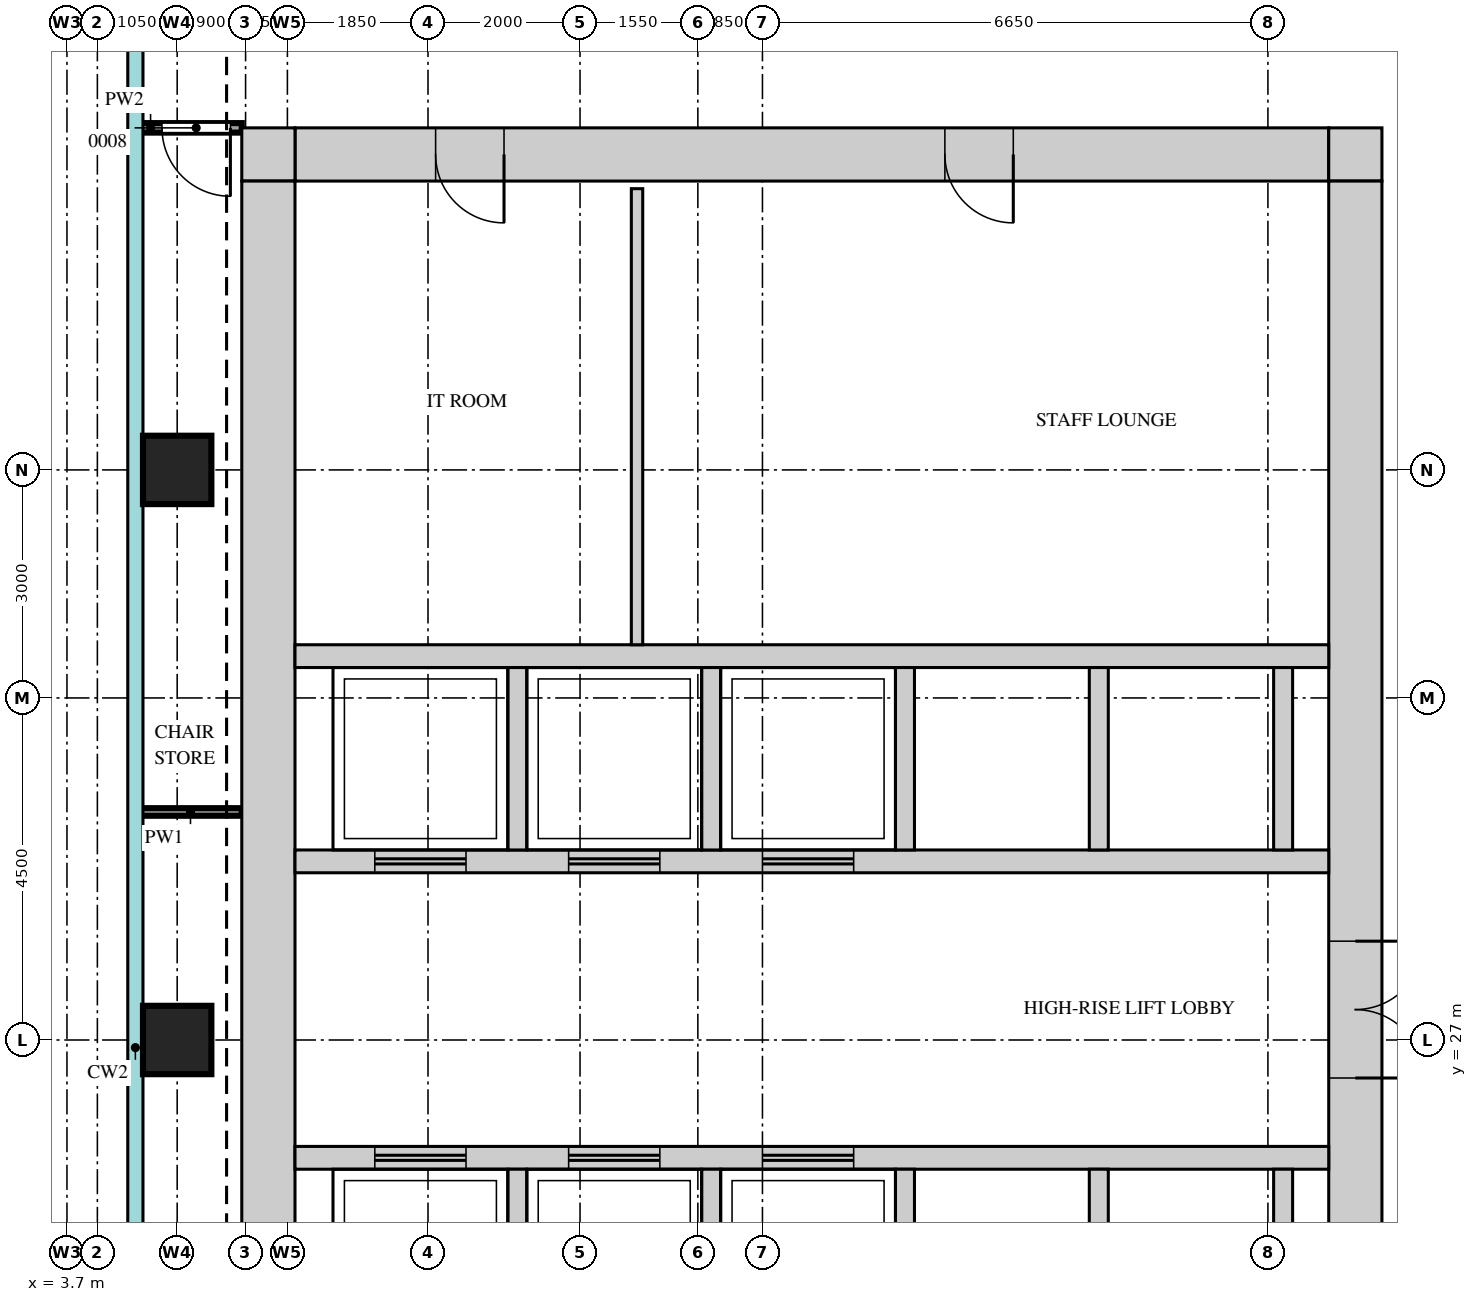
"""IFC4 building model, lengths in metres.
Left out: names, types, materials, properties, quantities, classifications, styles, units other than length and angle.
Written with IfcOpenShell. Run it as: python <this file> out.ifc"""

import sys

from ifc_helpers import new_model, si_unit, direction, frame, frame_2d, origin, origin_2d, place, context, subcontext, project, spatial, rectangle, extrude, source, transform, mapped, element, fill, save


model = new_model("IFC4")
c1 = context("Model", 3, precision=1e-05, world=origin(), true_north=direction((0.0, 1.0)))
c2 = subcontext(c1, "Body", "Model", "MODEL_VIEW")
j1 = project(units=[si_unit("LENGTHUNIT", "METRE"), si_unit("PLANEANGLEUNIT", "RADIAN")], contexts=[c1])
p1 = place(None, origin())
s1 = spatial("IfcSite", under=j1, at=p1, CompositionType="ELEMENT")
p2 = place(p1, origin())
s2 = spatial("IfcBuilding", under=s1, at=p2, CompositionType="ELEMENT")
p3 = place(p2, frame((0.0, 0.0, 262.2)))
s3 = spatial("IfcBuildingStorey", under=s2, at=p3, CompositionType="ELEMENT", Elevation=262.2)
m1 = source(origin(), c2, "Body", "SweptSolid", [
    extrude(rectangle(XDim=13.6, YDim=0.7, at=frame_2d((6.8, 0.0))), origin(), (0.0, 0.0, 1.0), 3.75),
])
p4 = place(p3, frame((6.7, 38.65, 0.0), z_axis=(0.0, 0.0, 1.0), x_axis=(1.0, 0.0, 0.0)))
e1 = element("IfcWall", 1, at=p4, inside=s3, PredefinedType="SHEAR", context=c2, shape_type="MappedRepresentation", body=[
    mapped(m1, transform((0.0, 0.0, 0.0))),
])
m2 = source(origin(), c2, "Body", "SweptSolid", [
    extrude(rectangle(XDim=0.9, YDim=2.1, at=frame_2d((0.45, 1.05))), frame((0.0, 0.36, 0.0), z_axis=(0.0, -1.0, 0.0), x_axis=(1.0, 0.0, 0.0)), (0.0, 0.0, 1.0), 0.72),
])
p5 = place(p4, frame((1.85, 0.0, 0.0)))
e2 = element("IfcOpeningElement", 2, at=p5, cuts=e1, PredefinedType="OPENING", context=c2, shape_type="MappedRepresentation", body=[
    mapped(m2, transform((0.0, 0.0, 0.0))),
])
p6 = place(p4, frame((8.55, 0.0, 0.0)))
e3 = element("IfcOpeningElement", 3, at=p6, cuts=e1, PredefinedType="OPENING", context=c2, shape_type="MappedRepresentation", body=[
    mapped(m2, transform((0.0, 0.0, 0.0))),
])
m3 = source(origin(), c2, "Body", "SweptSolid", [
    extrude(rectangle(XDim=0.7, YDim=0.7, at=frame_2d((0.35, 0.0))), origin(), (0.0, 0.0, 1.0), 3.75),
])
for number, where, z_axis, x_axis in (
    (4, (20.3, 38.65, 0.0), (0.0, 0.0, 1.0), (1.0, 0.0, 0.0)),
    (5, (6.0, 38.65, 0.0), (0.0, 0.0, 1.0), (1.0, 0.0, 0.0)),
):
    element("IfcWall", number, at=place(p3, frame(where, z_axis=z_axis, x_axis=x_axis)), inside=s3, PredefinedType="SHEAR", context=c2, shape_type="MappedRepresentation", body=[
        mapped(m3, transform((0.0, 0.0, 0.0))),
    ])
m4 = source(origin(), c2, "Body", "SweptSolid", [
    extrude(rectangle(XDim=22.6, YDim=0.7, at=frame_2d((11.3, 0.0))), origin(), (0.0, 0.0, 1.0), 3.75),
])
p7 = place(p3, frame((20.65, 15.7, 0.0), z_axis=(0.0, 0.0, 1.0), x_axis=(0.0, 1.0, 0.0)))
e6 = element("IfcWall", 6, at=p7, inside=s3, PredefinedType="SHEAR", context=c2, shape_type="MappedRepresentation", body=[
    mapped(m4, transform((0.0, 0.0, 0.0))),
])
m5 = source(origin(), c2, "Body", "SweptSolid", [
    extrude(rectangle(XDim=1.8, YDim=2.1, at=frame_2d((0.9, 1.05))), frame((0.0, 0.36, 0.0), z_axis=(0.0, -1.0, 0.0), x_axis=(1.0, 0.0, 0.0)), (0.0, 0.0, 1.0), 0.72),
])
p8 = place(p7, frame((10.8, 0.0, 0.0)))
e7 = element("IfcOpeningElement", 7, at=p8, cuts=e6, PredefinedType="OPENING", context=c2, shape_type="MappedRepresentation", body=[
    mapped(m5, transform((0.0, 0.0, 0.0))),
])
p9 = place(p7, frame((0.45, 0.0, 0.0)))
e8 = element("IfcOpeningElement", 8, at=p9, cuts=e6, PredefinedType="OPENING", context=c2, shape_type="MappedRepresentation", body=[
    mapped(m2, transform((0.0, 0.0, 0.0))),
])
p10 = place(p7, frame((2.25, 0.0, 0.0)))
e9 = element("IfcOpeningElement", 9, at=p10, cuts=e6, PredefinedType="OPENING", context=c2, shape_type="MappedRepresentation", body=[
    mapped(m2, transform((0.0, 0.0, 0.0))),
])
m6 = source(origin(), c2, "Body", "SweptSolid", [
    extrude(rectangle(XDim=1.0, YDim=2.1, at=frame_2d((0.5, 1.05))), frame((0.0, 0.36, 0.0), z_axis=(0.0, -1.0, 0.0), x_axis=(1.0, 0.0, 0.0)), (0.0, 0.0, 1.0), 0.72),
])
p11 = place(p7, frame((4.95, 0.0, 0.0)))
e10 = element("IfcOpeningElement", 10, at=p11, cuts=e6, PredefinedType="OPENING", context=c2, shape_type="MappedRepresentation", body=[
    mapped(m6, transform((0.0, 0.0, 0.0))),
])
p12 = place(p3, frame((6.35, 15.7, 0.0), z_axis=(0.0, 0.0, 1.0), x_axis=(0.0, 1.0, 0.0)))
e11 = element("IfcWall", 11, at=p12, inside=s3, PredefinedType="SHEAR", context=c2, shape_type="MappedRepresentation", body=[
    mapped(m4, transform((0.0, 0.0, 0.0))),
])
m7 = source(origin(), c2, "Body", "SweptSolid", [
    extrude(rectangle(XDim=13.6, YDim=0.3, at=frame_2d((6.8, 0.0))), origin(), (0.0, 0.0, 1.0), 3.75),
])
p13 = place(p3, frame((6.7, 32.05, 0.0), z_axis=(0.0, 0.0, 1.0), x_axis=(1.0, 0.0, 0.0)))
e12 = element("IfcWall", 12, at=p13, inside=s3, PredefinedType="STANDARD", context=c2, shape_type="MappedRepresentation", body=[
    mapped(m7, transform((0.0, 0.0, 0.0))),
])
p14 = place(p3, frame((6.7, 29.35, 0.0), z_axis=(0.0, 0.0, 1.0), x_axis=(1.0, 0.0, 0.0)))
e13 = element("IfcWall", 13, at=p14, inside=s3, PredefinedType="STANDARD", context=c2, shape_type="MappedRepresentation", body=[
    mapped(m7, transform((0.0, 0.0, 0.0))),
])
m8 = source(origin(), c2, "Body", "SweptSolid", [
    extrude(rectangle(XDim=1.2, YDim=2.1, at=frame_2d((0.6, 1.05))), frame((0.0, 0.16, 0.0), z_axis=(0.0, -1.0, 0.0), x_axis=(1.0, 0.0, 0.0)), (0.0, 0.0, 1.0), 0.32),
])
p15 = place(p14, frame((1.05, 0.0, 0.0)))
e14 = element("IfcOpeningElement", 14, at=p15, cuts=e13, PredefinedType="OPENING", context=c2, shape_type="MappedRepresentation", body=[
    mapped(m8, transform((0.0, 0.0, 0.0))),
])
p16 = place(p14, frame((3.6, 0.0, 0.0)))
e15 = element("IfcOpeningElement", 15, at=p16, cuts=e13, PredefinedType="OPENING", context=c2, shape_type="MappedRepresentation", body=[
    mapped(m8, transform((0.0, 0.0, 0.0))),
])
p17 = place(p14, frame((6.15, 0.0, 0.0)))
e16 = element("IfcOpeningElement", 16, at=p17, cuts=e13, PredefinedType="OPENING", context=c2, shape_type="MappedRepresentation", body=[
    mapped(m8, transform((0.0, 0.0, 0.0))),
])
p18 = place(p3, frame((6.7, 25.45, 0.0), z_axis=(0.0, 0.0, 1.0), x_axis=(1.0, 0.0, 0.0)))
e17 = element("IfcWall", 17, at=p18, inside=s3, PredefinedType="STANDARD", context=c2, shape_type="MappedRepresentation", body=[
    mapped(m7, transform((0.0, 0.0, 0.0))),
])
p19 = place(p18, frame((1.05, 0.0, 0.0)))
e18 = element("IfcOpeningElement", 18, at=p19, cuts=e17, PredefinedType="OPENING", context=c2, shape_type="MappedRepresentation", body=[
    mapped(m8, transform((0.0, 0.0, 0.0))),
])
p20 = place(p18, frame((3.6, 0.0, 0.0)))
e19 = element("IfcOpeningElement", 19, at=p20, cuts=e17, PredefinedType="OPENING", context=c2, shape_type="MappedRepresentation", body=[
    mapped(m8, transform((0.0, 0.0, 0.0))),
])
p21 = place(p18, frame((6.15, 0.0, 0.0)))
e20 = element("IfcOpeningElement", 20, at=p21, cuts=e17, PredefinedType="OPENING", context=c2, shape_type="MappedRepresentation", body=[
    mapped(m8, transform((0.0, 0.0, 0.0))),
])
m9 = source(origin(), c2, "Body", "SweptSolid", [
    extrude(rectangle(XDim=2.4, YDim=0.25, at=frame_2d((1.2, 0.0))), origin(), (0.0, 0.0, 1.0), 3.75),
])
for number, where, z_axis, x_axis in (
    (21, (17.275, 29.5, 0.0), (0.0, 0.0, 1.0), (0.0, 1.0, 0.0)),
    (22, (19.7, 29.5, 0.0), (0.0, 0.0, 1.0), (0.0, 1.0, 0.0)),
    (23, (9.625, 29.5, 0.0), (0.0, 0.0, 1.0), (0.0, 1.0, 0.0)),
    (24, (12.175, 29.5, 0.0), (0.0, 0.0, 1.0), (0.0, 1.0, 0.0)),
    (25, (14.725, 29.5, 0.0), (0.0, 0.0, 1.0), (0.0, 1.0, 0.0)),
):
    element("IfcWall", number, at=place(p3, frame(where, z_axis=z_axis, x_axis=x_axis)), inside=s3, PredefinedType="STANDARD", context=c2, shape_type="MappedRepresentation", body=[
        mapped(m9, transform((0.0, 0.0, 0.0))),
    ])
m10 = source(origin(), c2, "Body", "SweptSolid", [
    extrude(rectangle(XDim=2.4, YDim=0.25, at=frame_2d((1.2, 0.0))), origin(), (0.0, 0.0, 1.0), 3.75),
])
for number, where, z_axis, x_axis in (
    (26, (17.275, 22.9, 0.0), (0.0, 0.0, 1.0), (0.0, 1.0, 0.0)),
    (27, (19.7, 22.9, 0.0), (0.0, 0.0, 1.0), (0.0, 1.0, 0.0)),
    (28, (9.625, 22.9, 0.0), (0.0, 0.0, 1.0), (0.0, 1.0, 0.0)),
    (29, (12.175, 22.9, 0.0), (0.0, 0.0, 1.0), (0.0, 1.0, 0.0)),
    (30, (14.725, 22.9, 0.0), (0.0, 0.0, 1.0), (0.0, 1.0, 0.0)),
):
    element("IfcWall", number, at=place(p3, frame(where, z_axis=z_axis, x_axis=x_axis)), inside=s3, PredefinedType="STANDARD", context=c2, shape_type="MappedRepresentation", body=[
        mapped(m10, transform((0.0, 0.0, 0.0))),
    ])
m11 = source(origin(), c2, "Body", "SweptSolid", [
    extrude(rectangle(XDim=0.9, YDim=0.9, at=origin_2d()), origin(), (0.0, 0.0, 1.0), 3.75),
])
for number, where, z_axis, x_axis in (
    (31, (5.15, 27.0, 0.0), (0.0, 0.0, 1.0), (1.0, 0.0, 0.0)),
    (32, (5.15, 34.5, 0.0), (0.0, 0.0, 1.0), (1.0, 0.0, 0.0)),
):
    element("IfcColumn", number, at=place(p3, frame(where, z_axis=z_axis, x_axis=x_axis)), inside=s3, PredefinedType="COLUMN", context=c2, shape_type="MappedRepresentation", body=[
        mapped(m11, transform((0.0, 0.0, 0.0))),
    ])
m12 = source(origin(), c2, "Body", "SweptSolid", [
    extrude(rectangle(XDim=1.35, YDim=0.1, at=frame_2d((0.675, 0.0))), origin(), (0.0, 0.0, 1.0), 3.8),
])
p22 = place(p3, frame((4.65, 30.0, 0.0), z_axis=(0.0, 0.0, 1.0), x_axis=(1.0, 0.0, 0.0)))
e33 = element("IfcWall", 33, at=p22, inside=s3, PredefinedType="PARTITIONING", context=c2, shape_type="MappedRepresentation", body=[
    mapped(m12, transform((0.0, 0.0, 0.0))),
])
m13 = source(origin(), c2, "Body", "SweptSolid", [
    extrude(rectangle(XDim=6.0, YDim=0.15, at=frame_2d((3.0, 0.0))), origin(), (0.0, 0.0, 1.0), 3.8),
])
p23 = place(p3, frame((11.2, 32.2, 0.0), z_axis=(0.0, 0.0, 1.0), x_axis=(0.0, 1.0, 0.0)))
e34 = element("IfcWall", 34, at=p23, inside=s3, PredefinedType="PARTITIONING", context=c2, shape_type="MappedRepresentation", body=[
    mapped(m13, transform((0.0, 0.0, 0.0))),
])
m14 = source(origin(), c2, "Body", "SweptSolid", [
    extrude(rectangle(XDim=1.35, YDim=0.125, at=frame_2d((0.675, 0.0))), origin(), (0.0, 0.0, 1.0), 3.8),
])
p24 = place(p3, frame((4.65, 39.0, 0.0), z_axis=(0.0, 0.0, 1.0), x_axis=(1.0, 0.0, 0.0)))
e35 = element("IfcWall", 35, at=p24, inside=s3, PredefinedType="PARTITIONING", context=c2, shape_type="MappedRepresentation", body=[
    mapped(m14, transform((0.0, 0.0, 0.0))),
])
m15 = source(origin(), c2, "Body", "SweptSolid", [
    extrude(rectangle(XDim=0.9, YDim=2.1, at=frame_2d((0.45, 1.05))), frame((0.0, 0.073, 0.0), z_axis=(0.0, -1.0, 0.0), x_axis=(1.0, 0.0, 0.0)), (0.0, 0.0, 1.0), 0.145),
])
p25 = place(p24, frame((0.3, 0.0, 0.0)))
e36 = element("IfcOpeningElement", 36, at=p25, cuts=e35, PredefinedType="OPENING", context=c2, shape_type="MappedRepresentation", body=[
    mapped(m15, transform((0.0, 0.0, 0.0))),
])
m16 = source(origin(), c2, "Body", "SweptSolid", [
    extrude(rectangle(XDim=1.8, YDim=2.1, at=frame_2d((0.9, 1.05))), frame((0.0, 0.3, 0.0), z_axis=(0.0, -1.0, 0.0), x_axis=(1.0, 0.0, 0.0)), (0.0, 0.0, 1.0), 0.6),
])
p26 = place(p8, origin())
e37 = element("IfcDoor", 37, at=p26, inside=s3, OperationType="DOUBLE_DOOR_SINGLE_SWING", PredefinedType="DOOR", context=c2, shape_type="MappedRepresentation", body=[
    mapped(m16, transform((0.0, 0.0, 0.0))),
])
fill(e7, e37)
m17 = source(origin(), c2, "Body", "SweptSolid", [
    extrude(rectangle(XDim=0.9, YDim=2.1, at=frame_2d((0.45, 1.05))), frame((0.0, 0.3, 0.0), z_axis=(0.0, -1.0, 0.0), x_axis=(1.0, 0.0, 0.0)), (0.0, 0.0, 1.0), 0.6),
])
p27 = place(p5, origin())
e38 = element("IfcDoor", 38, at=p27, inside=s3, OperationType="SINGLE_SWING_RIGHT", PredefinedType="DOOR", context=c2, shape_type="MappedRepresentation", body=[
    mapped(m17, transform((0.0, 0.0, 0.0))),
])
fill(e2, e38)
p28 = place(p6, origin())
e39 = element("IfcDoor", 39, at=p28, inside=s3, OperationType="SINGLE_SWING_RIGHT", PredefinedType="DOOR", context=c2, shape_type="MappedRepresentation", body=[
    mapped(m17, transform((0.0, 0.0, 0.0))),
])
fill(e3, e39)
m18 = source(origin(), c2, "Body", "SweptSolid", [
    extrude(rectangle(XDim=0.9, YDim=2.1, at=frame_2d((0.45, 1.05))), frame((0.0, 0.025, 0.0), z_axis=(0.0, -1.0, 0.0), x_axis=(1.0, 0.0, 0.0)), (0.0, 0.0, 1.0), 0.05),
])
p29 = place(p25, origin())
e40 = element("IfcDoor", 40, at=p29, inside=s3, OperationType="SINGLE_SWING_RIGHT", PredefinedType="DOOR", context=c2, shape_type="MappedRepresentation", body=[
    mapped(m18, transform((0.0, 0.0, 0.0))),
])
fill(e36, e40)
m19 = source(origin(), c2, "Body", "SweptSolid", [
    extrude(rectangle(XDim=1.2, YDim=2.1, at=frame_2d((0.6, 1.05))), frame((0.0, 0.025, 0.0), z_axis=(0.0, -1.0, 0.0), x_axis=(1.0, 0.0, 0.0)), (0.0, 0.0, 1.0), 0.05),
])
p30 = place(p19, origin())
e41 = element("IfcDoor", 41, at=p30, inside=s3, OperationType="DOUBLE_DOOR_SLIDING", PredefinedType="DOOR", context=c2, shape_type="MappedRepresentation", body=[
    mapped(m19, transform((0.0, 0.0, 0.0))),
])
fill(e18, e41)
p31 = place(p20, origin())
e42 = element("IfcDoor", 42, at=p31, inside=s3, OperationType="DOUBLE_DOOR_SLIDING", PredefinedType="DOOR", context=c2, shape_type="MappedRepresentation", body=[
    mapped(m19, transform((0.0, 0.0, 0.0))),
])
fill(e19, e42)
p32 = place(p21, origin())
e43 = element("IfcDoor", 43, at=p32, inside=s3, OperationType="DOUBLE_DOOR_SLIDING", PredefinedType="DOOR", context=c2, shape_type="MappedRepresentation", body=[
    mapped(m19, transform((0.0, 0.0, 0.0))),
])
fill(e20, e43)
p33 = place(p15, origin())
e44 = element("IfcDoor", 44, at=p33, inside=s3, OperationType="DOUBLE_DOOR_SLIDING", PredefinedType="DOOR", context=c2, shape_type="MappedRepresentation", body=[
    mapped(m19, transform((0.0, 0.0, 0.0))),
])
fill(e14, e44)
p34 = place(p16, origin())
e45 = element("IfcDoor", 45, at=p34, inside=s3, OperationType="DOUBLE_DOOR_SLIDING", PredefinedType="DOOR", context=c2, shape_type="MappedRepresentation", body=[
    mapped(m19, transform((0.0, 0.0, 0.0))),
])
fill(e15, e45)
p35 = place(p17, origin())
e46 = element("IfcDoor", 46, at=p35, inside=s3, OperationType="DOUBLE_DOOR_SLIDING", PredefinedType="DOOR", context=c2, shape_type="MappedRepresentation", body=[
    mapped(m19, transform((0.0, 0.0, 0.0))),
])
fill(e16, e46)
save(model, sys.argv[1])
